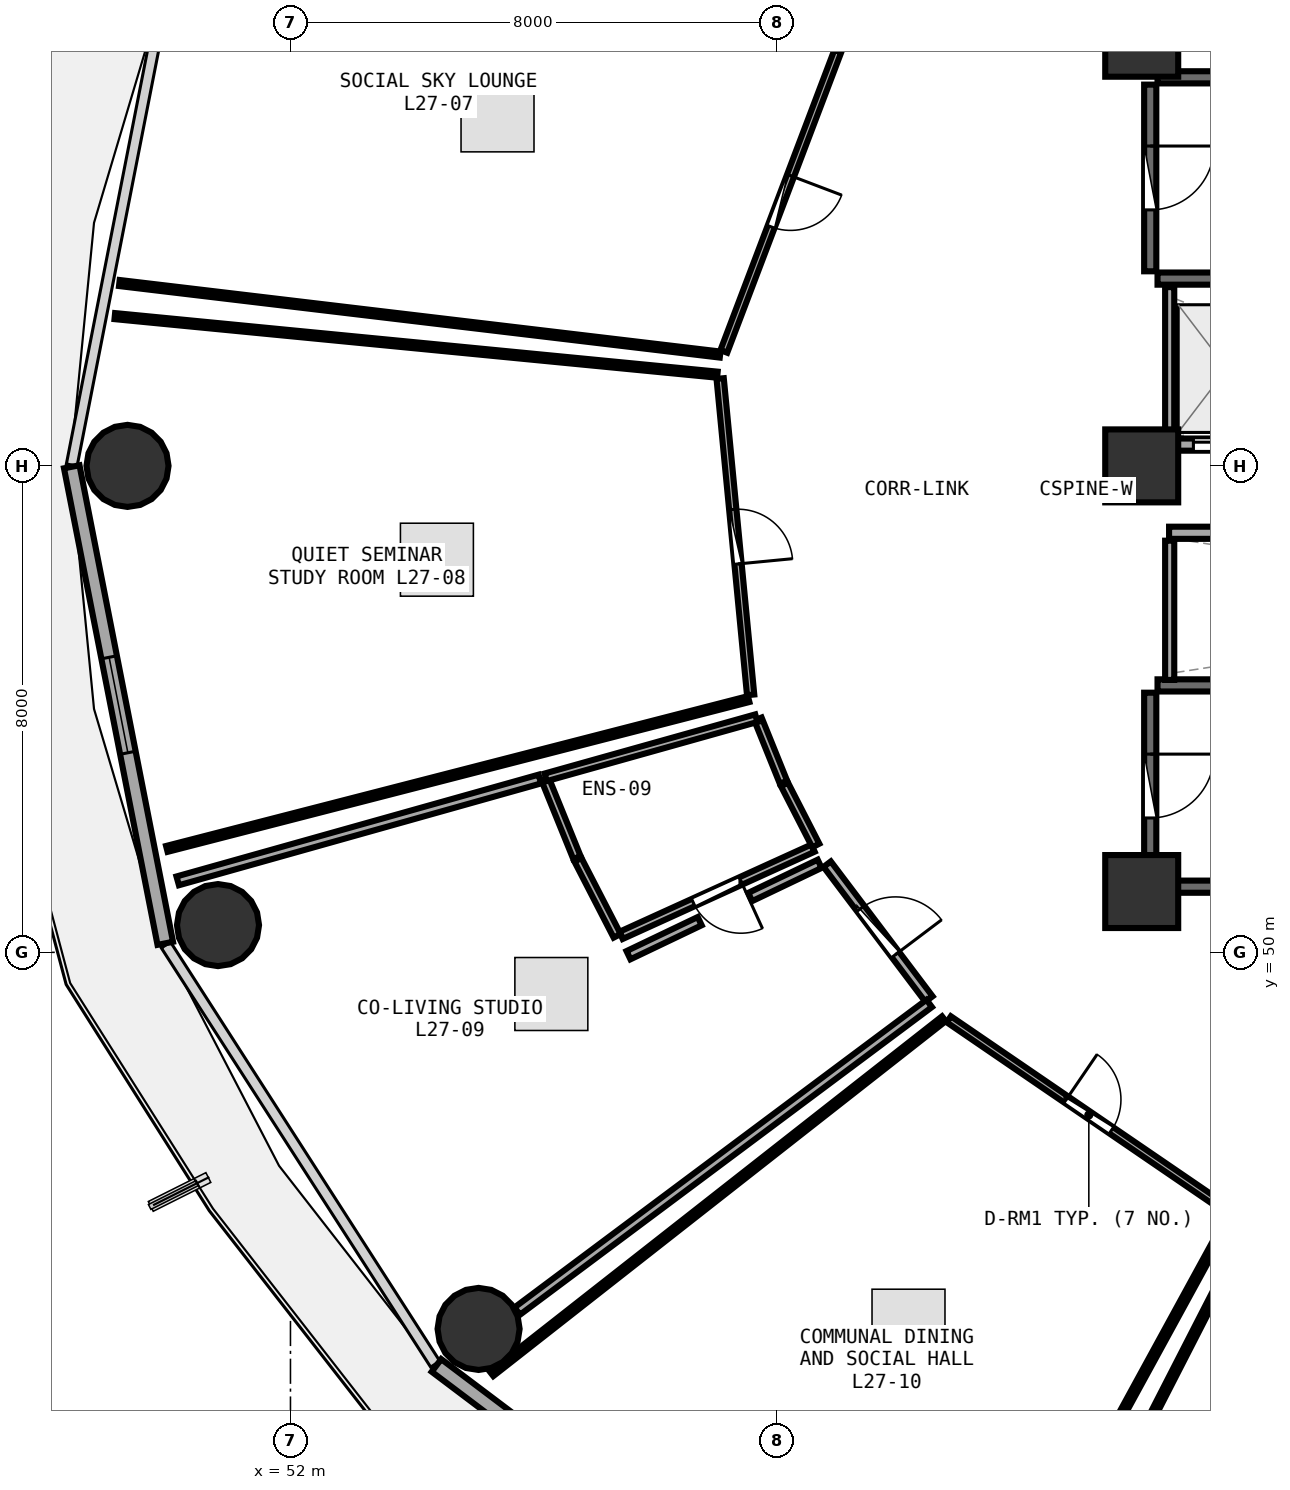
"""IFC4 building model, lengths in metres.
Left out: names, types, materials, properties, quantities, classifications, styles, units other than length and angle.
Written with IfcOpenShell. Run it as: python <this file> out.ifc"""

import sys

from ifc_helpers import new_model, si_unit, direction, frame, frame_2d, origin, origin_2d, place, context, subcontext, project, spatial, rectangle, circle, extrude, element, fill, save


model = new_model("IFC4")
c1 = context("Model", 3, precision=1e-05, world=origin(), true_north=direction((0.0, 1.0)))
c2 = subcontext(c1, "Body", "Model", "MODEL_VIEW")
j1 = project(units=[si_unit("LENGTHUNIT", "METRE"), si_unit("PLANEANGLEUNIT", "RADIAN")], contexts=[c1])
p1 = place(None, origin())
s1 = spatial("IfcSite", under=j1, at=p1, CompositionType="ELEMENT")
p2 = place(p1, origin())
s2 = spatial("IfcBuilding", under=s1, at=p2, CompositionType="ELEMENT")
p3 = place(p2, frame((0.0, 0.0, 106.35)))
s3 = spatial("IfcBuildingStorey", under=s2, at=p3, CompositionType="ELEMENT", Elevation=106.35)
for number, where, z_axis, x_axis in (
    (1, (66.0, 51.0, 0.0), (0.0, 0.0, 1.0), (1.0, 0.0, 0.0)),
    (2, (66.0, 65.0, 0.0), (0.0, 0.0, 1.0), (1.0, 0.0, 0.0)),
    (3, (66.0, 58.0, 0.0), (0.0, 0.0, 1.0), (1.0, 0.0, 0.0)),
):
    element("IfcColumn", number, at=place(p3, frame(where, z_axis=z_axis, x_axis=x_axis)), inside=s3, PredefinedType="PILASTER", context=c2, shape_type="SweptSolid", body=[
        extrude(rectangle(XDim=1.2, YDim=1.2, at=origin_2d()), origin(), (0.0, 0.0, 1.0), 3.75),
    ])
for number, where, z_axis, x_axis in (
    (4, (49.32, 58.0, 0.0), (0.0, 0.0, 1.0), (1.0, 0.0, 0.0)),
    (5, (50.808, 50.448, 0.0), (0.0, 0.0, 1.0), (1.0, 0.0, 0.0)),
    (6, (55.094, 43.807, 0.0), (0.0, 0.0, 1.0), (1.0, 0.0, 0.0)),
):
    element("IfcColumn", number, at=place(p3, frame(where, z_axis=z_axis, x_axis=x_axis)), inside=s3, PredefinedType="COLUMN", context=c2, shape_type="SweptSolid", body=[
        extrude(circle(Radius=0.675, at=origin_2d()), origin(), (0.0, 0.0, 1.0), 3.75),
    ])
p4 = place(p3, frame((48.403, 57.985, 0.0), z_axis=(0.0, 0.0, 1.0), x_axis=(0.192581843632, -0.981280914674, 0.0)))
e7 = element("IfcWall", 7, at=p4, inside=s3, PredefinedType="SOLIDWALL", context=c2, shape_type="SweptSolid", body=[
    extrude(rectangle(XDim=7.987, YDim=0.26, at=frame_2d((3.993, 0.0))), origin(), (0.0, 0.0, 1.0), 3.475),
])
p5 = place(p4, frame((3.193, 0.0, 0.85)))
e8 = element("IfcOpeningElement", 8, at=p5, cuts=e7, PredefinedType="OPENING", context=c2, shape_type="SweptSolid", body=[
    extrude(rectangle(XDim=1.6, YDim=1.45, at=frame_2d((0.8, 0.725))), frame((0.0, 0.14, 0.0), z_axis=(0.0, -1.0, 0.0), x_axis=(1.0, 0.0, 0.0)), (0.0, 0.0, 1.0), 0.28),
])
p6 = place(p3, frame((54.401, 43.207, 0.0), z_axis=(0.0, 0.0, 1.0), x_axis=(0.798501507879, -0.601992808857, 0.0)))
e9 = element("IfcWall", 9, at=p6, inside=s3, PredefinedType="SOLIDWALL", context=c2, shape_type="SweptSolid", body=[
    extrude(rectangle(XDim=8.499, YDim=0.26, at=frame_2d((4.25, 0.0))), origin(), (0.0, 0.0, 1.0), 3.475),
])
p7 = place(p6, frame((3.45, 0.0, 0.85)))
e10 = element("IfcOpeningElement", 10, at=p7, cuts=e9, PredefinedType="OPENING", context=c2, shape_type="SweptSolid", body=[
    extrude(rectangle(XDim=1.6, YDim=1.45, at=frame_2d((0.8, 0.725))), frame((0.0, 0.14, 0.0), z_axis=(0.0, -1.0, 0.0), x_axis=(1.0, 0.0, 0.0)), (0.0, 0.0, 1.0), 0.28),
])
for number, where, z_axis, x_axis in (
    (11, (66.26, 61.08, 0.0), (0.0, 0.0, 1.0), (1.0, 0.0, 0.0)),
    (12, (73.42, 64.39, 0.0), (0.0, 0.0, 1.0), (-1.0, 0.0, 0.0)),
):
    element("IfcWall", number, at=place(p3, frame(where, z_axis=z_axis, x_axis=x_axis)), inside=s3, PredefinedType="SHEAR", context=c2, shape_type="SweptSolid", body=[
        extrude(rectangle(XDim=7.16, YDim=0.2, at=frame_2d((3.58, 0.0))), origin(), (0.0, 0.0, 1.0), 3.49),
    ])
p8 = place(p3, frame((66.14, 64.27, 0.0), z_axis=(0.0, 0.0, 1.0), x_axis=(0.0, -1.0, 0.0)))
e13 = element("IfcWall", 13, at=p8, inside=s3, PredefinedType="SHEAR", context=c2, shape_type="SweptSolid", body=[
    extrude(rectangle(XDim=3.07, YDim=0.2, at=frame_2d((1.535, 0.0))), origin(), (0.0, 0.0, 1.0), 3.49),
])
p9 = place(p8, frame((1.01, 0.0, 0.0)))
e14 = element("IfcOpeningElement", 14, at=p9, cuts=e13, PredefinedType="OPENING", context=c2, shape_type="SweptSolid", body=[
    extrude(rectangle(XDim=1.05, YDim=2.1, at=frame_2d((0.525, 1.05))), frame((0.0, 0.11, 0.0), z_axis=(0.0, -1.0, 0.0), x_axis=(1.0, 0.0, 0.0)), (0.0, 0.0, 1.0), 0.22),
])
for number, where, z_axis, x_axis in (
    (15, (66.26, 51.08, 0.0), (0.0, 0.0, 1.0), (1.0, 0.0, 0.0)),
    (16, (73.42, 54.39, 0.0), (0.0, 0.0, 1.0), (-1.0, 0.0, 0.0)),
):
    element("IfcWall", number, at=place(p3, frame(where, z_axis=z_axis, x_axis=x_axis)), inside=s3, PredefinedType="SHEAR", context=c2, shape_type="SweptSolid", body=[
        extrude(rectangle(XDim=7.16, YDim=0.2, at=frame_2d((3.58, 0.0))), origin(), (0.0, 0.0, 1.0), 3.49),
    ])
p10 = place(p3, frame((66.14, 54.27, 0.0), z_axis=(0.0, 0.0, 1.0), x_axis=(0.0, -1.0, 0.0)))
e17 = element("IfcWall", 17, at=p10, inside=s3, PredefinedType="SHEAR", context=c2, shape_type="SweptSolid", body=[
    extrude(rectangle(XDim=3.07, YDim=0.2, at=frame_2d((1.535, 0.0))), origin(), (0.0, 0.0, 1.0), 3.49),
])
p11 = place(p10, frame((1.01, 0.0, 0.0)))
e18 = element("IfcOpeningElement", 18, at=p11, cuts=e17, PredefinedType="OPENING", context=c2, shape_type="SweptSolid", body=[
    extrude(rectangle(XDim=1.05, YDim=2.1, at=frame_2d((0.525, 1.05))), frame((0.0, 0.11, 0.0), z_axis=(0.0, -1.0, 0.0), x_axis=(1.0, 0.0, 0.0)), (0.0, 0.0, 1.0), 0.22),
])
p12 = place(p3, frame((66.45, 58.35, 0.0), z_axis=(0.0, 0.0, 1.0), x_axis=(1.0, 0.0, 0.0)))
e19 = element("IfcWall", 19, at=p12, inside=s3, PredefinedType="SOLIDWALL", context=c2, shape_type="SweptSolid", body=[
    extrude(rectangle(XDim=6.0, YDim=0.2, at=frame_2d((3.0, 0.0))), origin(), (0.0, 0.0, 1.0), 3.48),
])
p13 = place(p12, frame((0.4, 0.0, 0.0)))
e20 = element("IfcOpeningElement", 20, at=p13, cuts=e19, PredefinedType="OPENING", context=c2, shape_type="SweptSolid", body=[
    extrude(rectangle(XDim=1.1, YDim=2.1, at=frame_2d((0.55, 1.05))), frame((0.0, 0.11, 0.0), z_axis=(0.0, -1.0, 0.0), x_axis=(1.0, 0.0, 0.0)), (0.0, 0.0, 1.0), 0.22),
])
p14 = place(p12, frame((2.4, 0.0, 0.0)))
e21 = element("IfcOpeningElement", 21, at=p14, cuts=e19, PredefinedType="OPENING", context=c2, shape_type="SweptSolid", body=[
    extrude(rectangle(XDim=1.1, YDim=2.1, at=frame_2d((0.55, 1.05))), frame((0.0, 0.11, 0.0), z_axis=(0.0, -1.0, 0.0), x_axis=(1.0, 0.0, 0.0)), (0.0, 0.0, 1.0), 0.22),
])
p15 = place(p12, frame((4.4, 0.0, 0.0)))
e22 = element("IfcOpeningElement", 22, at=p15, cuts=e19, PredefinedType="OPENING", context=c2, shape_type="SweptSolid", body=[
    extrude(rectangle(XDim=1.1, YDim=2.1, at=frame_2d((0.55, 1.05))), frame((0.0, 0.11, 0.0), z_axis=(0.0, -1.0, 0.0), x_axis=(1.0, 0.0, 0.0)), (0.0, 0.0, 1.0), 0.22),
])
p16 = place(p3, frame((66.46, 58.48, 0.0), z_axis=(0.0, 0.0, 1.0), x_axis=(0.0, 1.0, 0.0)))
e23 = element("IfcWall", 23, at=p16, inside=s3, PredefinedType="PARTITIONING", context=c2, shape_type="SweptSolid", body=[
    extrude(rectangle(XDim=2.46, YDim=0.15, at=frame_2d((1.23, 0.0))), origin(), (0.0, 0.0, 1.0), 3.48),
])
p17 = place(p3, frame((66.45, 56.9, 0.0), z_axis=(0.0, 0.0, 1.0), x_axis=(1.0, 0.0, 0.0)))
e24 = element("IfcWall", 24, at=p17, inside=s3, PredefinedType="SOLIDWALL", context=c2, shape_type="SweptSolid", body=[
    extrude(rectangle(XDim=14.4, YDim=0.2, at=frame_2d((7.2, 0.0))), origin(), (0.0, 0.0, 1.0), 3.48),
])
p18 = place(p3, frame((66.46, 54.48, 0.0), z_axis=(0.0, 0.0, 1.0), x_axis=(0.0, 1.0, 0.0)))
e25 = element("IfcWall", 25, at=p18, inside=s3, PredefinedType="PARTITIONING", context=c2, shape_type="SweptSolid", body=[
    extrude(rectangle(XDim=2.29, YDim=0.15, at=frame_2d((1.145, 0.0))), origin(), (0.0, 0.0, 1.0), 3.48),
])
p19 = place(p3, frame((61.002, 64.821, 0.0), z_axis=(0.0, 0.0, 1.0), x_axis=(-0.354853458438, -0.934921934193, 0.0)))
e26 = element("IfcWall", 26, at=p19, inside=s3, PredefinedType="PARTITIONING", context=c2, shape_type="SweptSolid", body=[
    extrude(rectangle(XDim=5.282, YDim=0.12, at=frame_2d((2.641, 0.0))), origin(), (0.0, 0.0, 1.0), 3.235),
])
p20 = place(p19, frame((2.191, 0.0, 0.0)))
e27 = element("IfcOpeningElement", 27, at=p20, cuts=e26, PredefinedType="OPENING", context=c2, shape_type="SweptSolid", body=[
    extrude(rectangle(XDim=0.9, YDim=2.08, at=frame_2d((0.45, 1.04))), frame((0.0, 0.07, 0.0), z_axis=(0.0, -1.0, 0.0), x_axis=(1.0, 0.0, 0.0)), (0.0, 0.0, 1.0), 0.14),
])
p21 = place(p3, frame((59.067, 59.436, 0.0), z_axis=(0.0, 0.0, 1.0), x_axis=(0.095913591475, -0.995389663886, 0.0)))
e28 = element("IfcWall", 28, at=p21, inside=s3, PredefinedType="PARTITIONING", context=c2, shape_type="SweptSolid", body=[
    extrude(rectangle(XDim=5.226, YDim=0.12, at=frame_2d((2.613, 0.0))), origin(), (0.0, 0.0, 1.0), 2.925),
])
p22 = place(p21, frame((2.163, 0.0, 0.0)))
e29 = element("IfcOpeningElement", 29, at=p22, cuts=e28, PredefinedType="OPENING", context=c2, shape_type="SweptSolid", body=[
    extrude(rectangle(XDim=0.9, YDim=2.08, at=frame_2d((0.45, 1.04))), frame((0.0, 0.07, 0.0), z_axis=(0.0, -1.0, 0.0), x_axis=(1.0, 0.0, 0.0)), (0.0, 0.0, 1.0), 0.14),
])
p23 = place(p3, frame((60.594, 51.714, 0.0), z_axis=(0.0, 0.0, 1.0), x_axis=(-0.910380938799, -0.413771127885, 0.0)))
e30 = element("IfcWall", 30, at=p23, inside=s3, PredefinedType="PLUMBINGWALL", context=c2, shape_type="SweptSolid", body=[
    extrude(rectangle(XDim=3.469, YDim=0.13, at=frame_2d((1.734, 0.0))), origin(), (0.0, 0.0, 1.0), 2.925),
])
p24 = place(p23, frame((1.304, 0.0, 0.0)))
e31 = element("IfcOpeningElement", 31, at=p24, cuts=e30, PredefinedType="OPENING", context=c2, shape_type="SweptSolid", body=[
    extrude(rectangle(XDim=0.86, YDim=2.05, at=frame_2d((0.43, 1.025))), frame((0.0, 0.075, 0.0), z_axis=(0.0, -1.0, 0.0), x_axis=(1.0, 0.0, 0.0)), (0.0, 0.0, 1.0), 0.15),
])
p25 = place(p3, frame((60.827, 51.45, 0.0), z_axis=(0.0, 0.0, 1.0), x_axis=(0.602330864847, -0.798246534131, 0.0)))
e32 = element("IfcWall", 32, at=p25, inside=s3, PredefinedType="PARTITIONING", context=c2, shape_type="SweptSolid", body=[
    extrude(rectangle(XDim=2.779, YDim=0.15, at=frame_2d((1.389, 0.0))), origin(), (0.0, 0.0, 1.0), 2.925),
])
p26 = place(p25, frame((0.914, 0.0, 0.0)))
e33 = element("IfcOpeningElement", 33, at=p26, cuts=e32, PredefinedType="OPENING", context=c2, shape_type="SweptSolid", body=[
    extrude(rectangle(XDim=0.95, YDim=2.08, at=frame_2d((0.475, 1.04))), frame((0.0, 0.085, 0.0), z_axis=(0.0, -1.0, 0.0), x_axis=(1.0, 0.0, 0.0)), (0.0, 0.0, 1.0), 0.17),
])
p27 = place(p3, frame((62.827, 48.899, 0.0), z_axis=(0.0, 0.0, 1.0), x_axis=(0.825618475233, -0.564228795219, 0.0)))
e34 = element("IfcWall", 34, at=p27, inside=s3, PredefinedType="PARTITIONING", context=c2, shape_type="SweptSolid", body=[
    extrude(rectangle(XDim=5.578, YDim=0.12, at=frame_2d((2.789, 0.0))), origin(), (0.0, 0.0, 1.0), 2.925),
])
p28 = place(p27, frame((2.339, 0.0, 0.0)))
e35 = element("IfcOpeningElement", 35, at=p28, cuts=e34, PredefinedType="OPENING", context=c2, shape_type="SweptSolid", body=[
    extrude(rectangle(XDim=0.9, YDim=2.08, at=frame_2d((0.45, 1.04))), frame((0.0, 0.07, 0.0), z_axis=(0.0, -1.0, 0.0), x_axis=(1.0, 0.0, 0.0)), (0.0, 0.0, 1.0), 0.14),
])
p29 = place(p3, frame((59.066, 59.831, 0.0), z_axis=(0.0, 0.0, 1.0), x_axis=(-0.99298532521, 0.118237658624, 0.0)))
e36 = element("IfcWall", 36, at=p29, inside=s3, PredefinedType="PARTITIONING", context=c2, shape_type="SweptSolid", body=[
    extrude(rectangle(XDim=9.95, YDim=0.1, at=frame_2d((4.975, 0.0))), origin(), (0.0, 0.0, 1.0), 2.975),
])
p30 = place(p3, frame((59.535, 54.165, 0.0), z_axis=(0.0, 0.0, 1.0), x_axis=(-0.968404670054, -0.249384031201, 0.0)))
e37 = element("IfcWall", 37, at=p30, inside=s3, PredefinedType="PARTITIONING", context=c2, shape_type="SweptSolid", body=[
    extrude(rectangle(XDim=9.881, YDim=0.1, at=frame_2d((4.94, 0.0))), origin(), (0.0, 0.0, 1.0), 2.975),
])
p31 = place(p3, frame((49.111, 60.463, 0.0), z_axis=(0.0, 0.0, 1.0), x_axis=(0.995310801703, -0.096728527399, 0.0)))
e38 = element("IfcWall", 38, at=p31, inside=s3, PredefinedType="PARTITIONING", context=c2, shape_type="SweptSolid", body=[
    extrude(rectangle(XDim=9.957, YDim=0.1, at=frame_2d((4.979, 0.0))), origin(), (0.0, 0.0, 1.0), 2.975),
])
p32 = place(p3, frame((59.688, 53.837, 0.0), z_axis=(0.0, 0.0, 1.0), x_axis=(0.374466649307, -0.927240383372, 0.0)))
e39 = element("IfcWall", 39, at=p32, inside=s3, PredefinedType="PLUMBINGWALL", context=c2, shape_type="SweptSolid", body=[
    extrude(rectangle(XDim=1.121, YDim=0.13, at=frame_2d((0.561, 0.0))), origin(), (0.0, 0.0, 1.0), 3.235),
])
p33 = place(p3, frame((60.125, 52.761, 0.0), z_axis=(0.0, 0.0, 1.0), x_axis=(0.456189291516, -0.889882762113, 0.0)))
e40 = element("IfcWall", 40, at=p33, inside=s3, PredefinedType="PLUMBINGWALL", context=c2, shape_type="SweptSolid", body=[
    extrude(rectangle(XDim=1.129, YDim=0.13, at=frame_2d((0.564, 0.0))), origin(), (0.0, 0.0, 1.0), 3.235),
])
p34 = place(p3, frame((57.373, 50.272, 0.0), z_axis=(0.0, 0.0, 1.0), x_axis=(-0.458147751042, 0.888876053348, 0.0)))
e41 = element("IfcWall", 41, at=p34, inside=s3, PredefinedType="PLUMBINGWALL", context=c2, shape_type="SweptSolid", body=[
    extrude(rectangle(XDim=1.407, YDim=0.13, at=frame_2d((0.703, 0.0))), origin(), (0.0, 0.0, 1.0), 2.925),
])
p35 = place(p3, frame((56.711, 51.559, 0.0), z_axis=(0.0, 0.0, 1.0), x_axis=(-0.376021150564, 0.926611080405, 0.0)))
e42 = element("IfcWall", 42, at=p35, inside=s3, PredefinedType="PLUMBINGWALL", context=c2, shape_type="SweptSolid", body=[
    extrude(rectangle(XDim=1.398, YDim=0.13, at=frame_2d((0.699, 0.0))), origin(), (0.0, 0.0, 1.0), 3.175),
])
p36 = place(p3, frame((56.197, 52.878, 0.0), z_axis=(0.0, 0.0, 1.0), x_axis=(0.962808829557, 0.270183563023, 0.0)))
e43 = element("IfcWall", 43, at=p36, inside=s3, PredefinedType="PLUMBINGWALL", context=c2, shape_type="SweptSolid", body=[
    extrude(rectangle(XDim=3.598, YDim=0.13, at=frame_2d((1.799, 0.0))), origin(), (0.0, 0.0, 1.0), 3.175),
])
p37 = place(p3, frame((62.505, 49.16, 0.0), z_axis=(0.0, 0.0, 1.0), x_axis=(-0.801231684565, -0.598354232582, 0.0)))
e44 = element("IfcWall", 44, at=p37, inside=s3, PredefinedType="PARTITIONING", context=c2, shape_type="SweptSolid", body=[
    extrude(rectangle(XDim=8.456, YDim=0.15, at=frame_2d((4.228, 0.0))), origin(), (0.0, 0.0, 1.0), 2.925),
])
p38 = place(p3, frame((50.146, 51.176, 0.0), z_axis=(0.0, 0.0, 1.0), x_axis=(0.962685643461, 0.270622157028, 0.0)))
e45 = element("IfcWall", 45, at=p38, inside=s3, PredefinedType="PARTITIONING", context=c2, shape_type="SweptSolid", body=[
    extrude(rectangle(XDim=6.187, YDim=0.15, at=frame_2d((3.094, 0.0))), origin(), (0.0, 0.0, 1.0), 2.975),
])
p39 = place(p3, frame((57.559, 49.953, 0.0), z_axis=(0.0, 0.0, 1.0), x_axis=(0.902185129063, 0.431349038364, 0.0)))
e46 = element("IfcWall", 46, at=p39, inside=s3, PredefinedType="PARTITIONING", context=c2, shape_type="SweptSolid", body=[
    extrude(rectangle(XDim=1.298, YDim=0.15, at=frame_2d((0.649, 0.0))), origin(), (0.0, 0.0, 1.0), 3.175),
])
p40 = place(p3, frame((59.561, 50.91, 0.0), z_axis=(0.0, 0.0, 1.0), x_axis=(0.902228812368, 0.431257660955, 0.0)))
e47 = element("IfcWall", 47, at=p40, inside=s3, PredefinedType="PARTITIONING", context=c2, shape_type="SweptSolid", body=[
    extrude(rectangle(XDim=1.266, YDim=0.15, at=frame_2d((0.633, 0.0))), origin(), (0.0, 0.0, 1.0), 2.925),
])
p41 = place(p3, frame((67.463, 45.683, 0.0), z_axis=(0.0, 0.0, 1.0), x_axis=(-0.479571724153, -0.87750268455, 0.0)))
e48 = element("IfcWall", 48, at=p41, inside=s3, PredefinedType="PARTITIONING", context=c2, shape_type="SweptSolid", body=[
    extrude(rectangle(XDim=9.007, YDim=0.1, at=frame_2d((4.503, 0.0))), origin(), (0.0, 0.0, 1.0), 2.925),
])
p42 = place(p3, frame((55.305, 43.071, 0.0), z_axis=(0.0, 0.0, 1.0), x_axis=(0.78679196563, 0.6172182781, 0.0)))
e49 = element("IfcWall", 49, at=p42, inside=s3, PredefinedType="PARTITIONING", context=c2, shape_type="SweptSolid", body=[
    extrude(rectangle(XDim=9.458, YDim=0.1, at=frame_2d((4.729, 0.0))), origin(), (0.0, 0.0, 1.0), 2.925),
])
p43 = place(p3, frame((63.697, 37.548, 0.0), z_axis=(0.0, 0.0, 1.0), x_axis=(0.456266444918, 0.889843205987, 0.0)))
e50 = element("IfcWall", 50, at=p43, inside=s3, PredefinedType="PARTITIONING", context=c2, shape_type="SweptSolid", body=[
    extrude(rectangle(XDim=8.985, YDim=0.1, at=frame_2d((4.492, 0.0))), origin(), (0.0, 0.0, 1.0), 2.925),
])
p44 = place(p5, origin())
e51 = element("IfcWindow", 51, at=p44, inside=s3, PartitioningType="SINGLE_PANEL", PredefinedType="WINDOW", context=c2, shape_type="SweptSolid", body=[
    extrude(rectangle(XDim=1.6, YDim=1.45, at=frame_2d((0.8, 0.725))), frame((0.0, 0.03, 0.0), z_axis=(0.0, -1.0, 0.0), x_axis=(1.0, 0.0, 0.0)), (0.0, 0.0, 1.0), 0.06),
])
fill(e8, e51)
p45 = place(p9, origin())
e52 = element("IfcDoor", 52, at=p45, inside=s3, OperationType="SINGLE_SWING_LEFT", PredefinedType="DOOR", context=c2, shape_type="SweptSolid", body=[
    extrude(rectangle(XDim=1.05, YDim=2.1, at=frame_2d((0.525, 1.05))), frame((0.0, 0.025, 0.0), z_axis=(0.0, -1.0, 0.0), x_axis=(1.0, 0.0, 0.0)), (0.0, 0.0, 1.0), 0.05),
])
fill(e14, e52)
p46 = place(p11, origin())
e53 = element("IfcDoor", 53, at=p46, inside=s3, OperationType="SINGLE_SWING_LEFT", PredefinedType="DOOR", context=c2, shape_type="SweptSolid", body=[
    extrude(rectangle(XDim=1.05, YDim=2.1, at=frame_2d((0.525, 1.05))), frame((0.0, 0.025, 0.0), z_axis=(0.0, -1.0, 0.0), x_axis=(1.0, 0.0, 0.0)), (0.0, 0.0, 1.0), 0.05),
])
fill(e18, e53)
p47 = place(p13, origin())
e54 = element("IfcDoor", 54, at=p47, inside=s3, OperationType="DOUBLE_DOOR_SLIDING", PredefinedType="DOOR", context=c2, shape_type="SweptSolid", body=[
    extrude(rectangle(XDim=1.1, YDim=2.1, at=frame_2d((0.55, 1.05))), frame((0.0, 0.025, 0.0), z_axis=(0.0, -1.0, 0.0), x_axis=(1.0, 0.0, 0.0)), (0.0, 0.0, 1.0), 0.05),
])
fill(e20, e54)
p48 = place(p20, origin())
e55 = element("IfcDoor", 55, at=p48, inside=s3, OperationType="SINGLE_SWING_LEFT", PredefinedType="DOOR", context=c2, shape_type="SweptSolid", body=[
    extrude(rectangle(XDim=0.9, YDim=2.08, at=frame_2d((0.45, 1.04))), frame((0.0, 0.025, 0.0), z_axis=(0.0, -1.0, 0.0), x_axis=(1.0, 0.0, 0.0)), (0.0, 0.0, 1.0), 0.05),
])
fill(e27, e55)
p49 = place(p22, origin())
e56 = element("IfcDoor", 56, at=p49, inside=s3, OperationType="SINGLE_SWING_RIGHT", PredefinedType="DOOR", context=c2, shape_type="SweptSolid", body=[
    extrude(rectangle(XDim=0.9, YDim=2.08, at=frame_2d((0.45, 1.04))), frame((0.0, 0.025, 0.0), z_axis=(0.0, -1.0, 0.0), x_axis=(1.0, 0.0, 0.0)), (0.0, 0.0, 1.0), 0.05),
])
fill(e29, e56)
p50 = place(p24, origin())
e57 = element("IfcDoor", 57, at=p50, inside=s3, OperationType="SINGLE_SWING_LEFT", PredefinedType="DOOR", context=c2, shape_type="SweptSolid", body=[
    extrude(rectangle(XDim=0.86, YDim=2.05, at=frame_2d((0.43, 1.025))), frame((0.0, 0.025, 0.0), z_axis=(0.0, -1.0, 0.0), x_axis=(1.0, 0.0, 0.0)), (0.0, 0.0, 1.0), 0.05),
])
fill(e31, e57)
p51 = place(p26, origin())
e58 = element("IfcDoor", 58, at=p51, inside=s3, OperationType="SINGLE_SWING_RIGHT", PredefinedType="DOOR", context=c2, shape_type="SweptSolid", body=[
    extrude(rectangle(XDim=0.95, YDim=2.08, at=frame_2d((0.475, 1.04))), frame((0.0, 0.025, 0.0), z_axis=(0.0, -1.0, 0.0), x_axis=(1.0, 0.0, 0.0)), (0.0, 0.0, 1.0), 0.05),
])
fill(e33, e58)
p52 = place(p28, origin())
e59 = element("IfcDoor", 59, at=p52, inside=s3, OperationType="SINGLE_SWING_LEFT", PredefinedType="DOOR", context=c2, shape_type="SweptSolid", body=[
    extrude(rectangle(XDim=0.9, YDim=2.08, at=frame_2d((0.45, 1.04))), frame((0.0, 0.025, 0.0), z_axis=(0.0, -1.0, 0.0), x_axis=(1.0, 0.0, 0.0)), (0.0, 0.0, 1.0), 0.05),
])
fill(e35, e59)
save(model, sys.argv[1])
